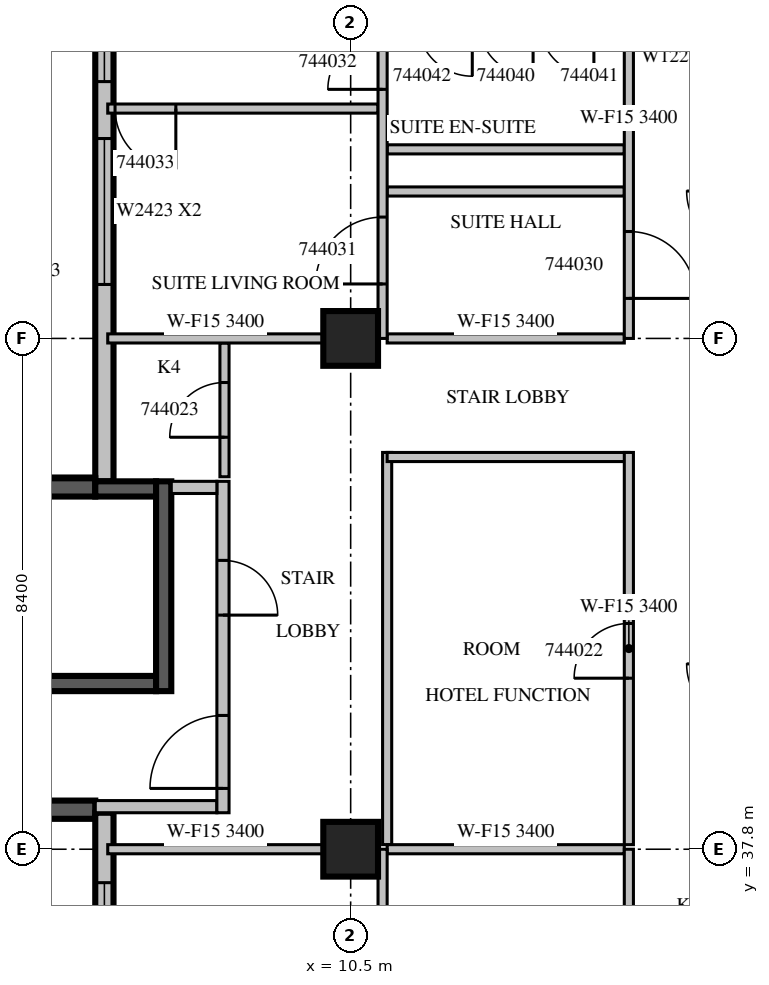
"""IFC4 building model, lengths in metres.
Left out: names, types, materials, properties, quantities, classifications, styles, units other than length and angle.
Written with IfcOpenShell. Run it as: python <this file> out.ifc"""

import sys

from ifc_helpers import new_model, si_unit, direction, frame, frame_2d, origin, origin_2d, place, context, subcontext, project, spatial, rectangle, extrude, source, transform, mapped, element, fill, save


model = new_model("IFC4")
c1 = context("Model", 3, precision=1e-05, world=origin(), true_north=direction((0.0, 1.0)))
c2 = subcontext(c1, "Body", "Model", "MODEL_VIEW")
j1 = project(units=[si_unit("LENGTHUNIT", "METRE"), si_unit("PLANEANGLEUNIT", "RADIAN")], contexts=[c1])
p1 = place(None, origin())
s1 = spatial("IfcSite", under=j1, at=p1, CompositionType="ELEMENT")
p2 = place(p1, origin())
s2 = spatial("IfcBuilding", under=s1, at=p2, CompositionType="ELEMENT")
p3 = place(p2, frame((0.0, 0.0, 200.6)))
s3 = spatial("IfcBuildingStorey", under=s2, at=p3, CompositionType="ELEMENT", Elevation=200.6)
m1 = source(origin(), c2, "Body", "SweptSolid", [
    extrude(rectangle(XDim=0.9, YDim=0.9, at=origin_2d()), origin(), (0.0, 0.0, 1.0), 3.8),
])
for number, where, z_axis, x_axis in (
    (1, (10.5, 37.8, 0.0), (0.0, 0.0, 1.0), (1.0, 0.0, 0.0)),
    (2, (10.5, 46.2, 0.0), (0.0, 0.0, 1.0), (1.0, 0.0, 0.0)),
):
    element("IfcColumn", number, at=place(p3, frame(where, z_axis=z_axis, x_axis=x_axis)), inside=s3, PredefinedType="COLUMN", context=c2, shape_type="MappedRepresentation", body=[
        mapped(m1, transform((0.0, 0.0, 0.0), scale=1.0)),
    ])
m2 = source(origin(), c2, "Body", "SweptSolid", [
    extrude(rectangle(XDim=9.91, YDim=0.3, at=frame_2d((4.955, 0.0))), origin(), (0.0, 0.0, 1.0), 3.4),
])
p4 = place(p3, frame((6.45, 53.76, 0.0), z_axis=(0.0, 0.0, 1.0), x_axis=(0.0, -1.0, 0.0)))
e3 = element("IfcWall", 3, at=p4, inside=s3, PredefinedType="STANDARD", context=c2, shape_type="MappedRepresentation", body=[
    mapped(m2, transform((0.0, 0.0, 0.0), scale=1.0)),
])
m3 = source(origin(), c2, "Body", "SweptSolid", [
    extrude(rectangle(XDim=2.4, YDim=2.3, at=frame_2d((1.2, 1.15))), frame((0.0, 0.16, 0.0), z_axis=(0.0, -1.0, 0.0), x_axis=(1.0, 0.0, 0.0)), (0.0, 0.0, 1.0), 0.32),
])
p5 = place(p4, frame((4.272, 0.0, 0.6)))
e4 = element("IfcOpeningElement", 4, at=p5, cuts=e3, PredefinedType="OPENING", context=c2, shape_type="MappedRepresentation", body=[
    mapped(m3, transform((0.0, 0.0, 0.0), scale=1.0)),
])
p6 = place(p4, frame((0.936, 0.0, 0.6)))
e5 = element("IfcOpeningElement", 5, at=p6, cuts=e3, PredefinedType="OPENING", context=c2, shape_type="MappedRepresentation", body=[
    mapped(m3, transform((0.0, 0.0, 0.0), scale=1.0)),
])
m4 = source(origin(), c2, "Body", "SweptSolid", [
    extrude(rectangle(XDim=6.1, YDim=0.3, at=frame_2d((3.05, 0.0))), origin(), (0.0, 0.0, 1.0), 3.4),
])
for number, where, z_axis, x_axis in (
    (6, (6.3, 43.75, 0.0), (0.0, 0.0, 1.0), (-1.0, 0.0, 0.0)),
    (7, (0.2, 38.45, 0.0), (0.0, 0.0, 1.0), (1.0, 0.0, 0.0)),
):
    element("IfcWall", number, at=place(p3, frame(where, z_axis=z_axis, x_axis=x_axis)), inside=s3, PredefinedType="SOLIDWALL", context=c2, shape_type="MappedRepresentation", body=[
        mapped(m4, transform((0.0, 0.0, 0.0), scale=1.0)),
    ])
m5 = source(origin(), c2, "Body", "SweptSolid", [
    extrude(rectangle(XDim=16.6, YDim=0.3, at=frame_2d((8.3, 0.0))), origin(), (0.0, 0.0, 1.0), 3.4),
])
p7 = place(p3, frame((6.45, 38.4, 0.0), z_axis=(0.0, 0.0, 1.0), x_axis=(0.0, -1.0, 0.0)))
e8 = element("IfcWall", 8, at=p7, inside=s3, PredefinedType="STANDARD", context=c2, shape_type="MappedRepresentation", body=[
    mapped(m5, transform((0.0, 0.0, 0.0), scale=1.0)),
])
m6 = source(origin(), c2, "Body", "SweptSolid", [
    extrude(rectangle(XDim=1.8, YDim=2.3, at=frame_2d((0.9, 1.15))), frame((0.0, 0.16, 0.0), z_axis=(0.0, -1.0, 0.0), x_axis=(1.0, 0.0, 0.0)), (0.0, 0.0, 1.0), 0.32),
])
p8 = place(p7, frame((1.15, 0.0, 0.6)))
e9 = element("IfcOpeningElement", 9, at=p8, cuts=e8, PredefinedType="OPENING", context=c2, shape_type="MappedRepresentation", body=[
    mapped(m6, transform((0.0, 0.0, 0.0), scale=1.0)),
])
p9 = place(p7, frame((9.438, 0.0, 0.6)))
e10 = element("IfcOpeningElement", 10, at=p9, cuts=e8, PredefinedType="OPENING", context=c2, shape_type="MappedRepresentation", body=[
    mapped(m6, transform((0.0, 0.0, 0.0), scale=1.0)),
])
m7 = source(origin(), c2, "Body", "SweptSolid", [
    extrude(rectangle(XDim=1.2, YDim=2.3, at=frame_2d((0.6, 1.15))), frame((0.0, 0.16, 0.0), z_axis=(0.0, -1.0, 0.0), x_axis=(1.0, 0.0, 0.0)), (0.0, 0.0, 1.0), 0.32),
])
p10 = place(p7, frame((14.338, 0.0, 0.6)))
e11 = element("IfcOpeningElement", 11, at=p10, cuts=e8, PredefinedType="OPENING", context=c2, shape_type="MappedRepresentation", body=[
    mapped(m7, transform((0.0, 0.0, 0.0), scale=1.0)),
])
p11 = place(p7, frame((11.887, 0.0, 0.6)))
e12 = element("IfcOpeningElement", 12, at=p11, cuts=e8, PredefinedType="OPENING", context=c2, shape_type="MappedRepresentation", body=[
    mapped(m6, transform((0.0, 0.0, 0.0), scale=1.0)),
])
m8 = source(origin(), c2, "Body", "SweptSolid", [
    extrude(rectangle(XDim=1.0, YDim=2.1, at=frame_2d((0.5, 1.05))), frame((0.0, 0.16, 0.0), z_axis=(0.0, -1.0, 0.0), x_axis=(1.0, 0.0, 0.0)), (0.0, 0.0, 1.0), 0.32),
])
p12 = place(p7, frame((5.908, 0.0, 0.0)))
e13 = element("IfcOpeningElement", 13, at=p12, cuts=e8, PredefinedType="OPENING", context=c2, shape_type="MappedRepresentation", body=[
    mapped(m8, transform((0.0, 0.0, 0.0), scale=1.0)),
])
m9 = source(origin(), c2, "Body", "SweptSolid", [
    extrude(rectangle(XDim=7.0, YDim=0.25, at=frame_2d((3.5, 0.0))), origin(), (0.0, 0.0, 1.0), 3.4),
])
p13 = place(p3, frame((0.3, 40.525, 0.0), z_axis=(0.0, 0.0, 1.0), x_axis=(1.0, 0.0, 0.0)))
e14 = element("IfcWall", 14, at=p13, inside=s3, PredefinedType="SOLIDWALL", context=c2, shape_type="MappedRepresentation", body=[
    mapped(m9, transform((0.0, 0.0, 0.0), scale=1.0)),
])
m10 = source(origin(), c2, "Body", "SweptSolid", [
    extrude(rectangle(XDim=1.1, YDim=2.1, at=frame_2d((0.55, 1.05))), frame((0.0, 0.135, 0.0), z_axis=(0.0, -1.0, 0.0), x_axis=(1.0, 0.0, 0.0)), (0.0, 0.0, 1.0), 0.27),
])
p14 = place(p13, frame((0.55, 0.0, 0.0)))
e15 = element("IfcOpeningElement", 15, at=p14, cuts=e14, PredefinedType="OPENING", context=c2, shape_type="MappedRepresentation", body=[
    mapped(m10, transform((0.0, 0.0, 0.0), scale=1.0)),
])
m11 = source(origin(), c2, "Body", "SweptSolid", [
    extrude(rectangle(XDim=1.0, YDim=0.25, at=frame_2d((0.5, 0.0))), origin(), (0.0, 0.0, 1.0), 3.4),
])
p15 = place(p3, frame((6.3, 43.725, 0.0), z_axis=(0.0, 0.0, 1.0), x_axis=(1.0, 0.0, 0.0)))
e16 = element("IfcWall", 16, at=p15, inside=s3, PredefinedType="SOLIDWALL", context=c2, shape_type="MappedRepresentation", body=[
    mapped(m11, transform((0.0, 0.0, 0.0), scale=1.0)),
])
m12 = source(origin(), c2, "Body", "SweptSolid", [
    extrude(rectangle(XDim=3.45, YDim=0.25, at=frame_2d((1.725, 0.0))), origin(), (0.0, 0.0, 1.0), 3.4),
])
p16 = place(p3, frame((7.425, 40.4, 0.0), z_axis=(0.0, 0.0, 1.0), x_axis=(0.0, 1.0, 0.0)))
e17 = element("IfcWall", 17, at=p16, inside=s3, PredefinedType="SOLIDWALL", context=c2, shape_type="MappedRepresentation", body=[
    mapped(m12, transform((0.0, 0.0, 0.0), scale=1.0)),
])
m13 = source(origin(), c2, "Body", "SweptSolid", [
    extrude(rectangle(XDim=2.0, YDim=0.2, at=frame_2d((1.0, 0.0))), origin(), (0.0, 0.0, 1.0), 3.4),
])
p17 = place(p3, frame((6.3, 38.5, 0.0), z_axis=(0.0, 0.0, 1.0), x_axis=(1.0, 0.0, 0.0)))
e18 = element("IfcWall", 18, at=p17, inside=s3, PredefinedType="PARTITIONING", context=c2, shape_type="MappedRepresentation", body=[
    mapped(m13, transform((0.0, 0.0, 0.0), scale=1.0)),
])
m14 = source(origin(), c2, "Body", "SweptSolid", [
    extrude(rectangle(XDim=5.45, YDim=0.2, at=frame_2d((2.725, 0.0))), origin(), (0.0, 0.0, 1.0), 3.4),
])
p18 = place(p3, frame((8.4, 38.4, 0.0), z_axis=(0.0, 0.0, 1.0), x_axis=(0.0, 1.0, 0.0)))
e19 = element("IfcWall", 19, at=p18, inside=s3, PredefinedType="PARTITIONING", context=c2, shape_type="MappedRepresentation", body=[
    mapped(m14, transform((0.0, 0.0, 0.0), scale=1.0)),
])
m15 = source(origin(), c2, "Body", "SweptSolid", [
    extrude(rectangle(XDim=1.2, YDim=2.1, at=frame_2d((0.6, 1.05))), frame((0.0, 0.11, 0.0), z_axis=(0.0, -1.0, 0.0), x_axis=(1.0, 0.0, 0.0)), (0.0, 0.0, 1.0), 0.22),
])
p19 = place(p18, frame((0.4, 0.0, 0.0)))
e20 = element("IfcOpeningElement", 20, at=p19, cuts=e19, PredefinedType="OPENING", context=c2, shape_type="MappedRepresentation", body=[
    mapped(m15, transform((0.0, 0.0, 0.0), scale=1.0)),
])
m16 = source(origin(), c2, "Body", "SweptSolid", [
    extrude(rectangle(XDim=0.9, YDim=2.1, at=frame_2d((0.45, 1.05))), frame((0.0, 0.11, 0.0), z_axis=(0.0, -1.0, 0.0), x_axis=(1.0, 0.0, 0.0)), (0.0, 0.0, 1.0), 0.22),
])
p20 = place(p18, frame((3.25, 0.0, 0.0)))
e21 = element("IfcOpeningElement", 21, at=p20, cuts=e19, PredefinedType="OPENING", context=c2, shape_type="MappedRepresentation", body=[
    mapped(m16, transform((0.0, 0.0, 0.0), scale=1.0)),
])
m17 = source(origin(), c2, "Body", "SweptSolid", [
    extrude(rectangle(XDim=0.75, YDim=0.2, at=frame_2d((0.375, 0.0))), origin(), (0.0, 0.0, 1.0), 3.4),
])
p21 = place(p3, frame((7.55, 43.75, 0.0), z_axis=(0.0, 0.0, 1.0), x_axis=(1.0, 0.0, 0.0)))
e22 = element("IfcWall", 22, at=p21, inside=s3, PredefinedType="PARTITIONING", context=c2, shape_type="MappedRepresentation", body=[
    mapped(m17, transform((0.0, 0.0, 0.0), scale=1.0)),
])
m18 = source(origin(), c2, "Body", "SweptSolid", [
    extrude(rectangle(XDim=6.45, YDim=0.15, at=frame_2d((3.225, 0.0))), origin(), (0.0, 0.0, 1.0), 3.4),
])
p22 = place(p3, frame((11.1, 44.325, 0.0), z_axis=(0.0, 0.0, 1.0), x_axis=(0.0, -1.0, 0.0)))
e23 = element("IfcWall", 23, at=p22, inside=s3, PredefinedType="PARTITIONING", context=c2, shape_type="MappedRepresentation", body=[
    mapped(m18, transform((0.0, 0.0, 0.0), scale=1.0)),
])
m19 = source(origin(), c2, "Body", "SweptSolid", [
    extrude(rectangle(XDim=3.975, YDim=0.15, at=frame_2d((1.988, 0.0))), origin(), (0.0, 0.0, 1.0), 3.4),
])
p23 = place(p3, frame((15.075, 44.25, 0.0), z_axis=(0.0, 0.0, 1.0), x_axis=(-1.0, 0.0, 0.0)))
e24 = element("IfcWall", 24, at=p23, inside=s3, PredefinedType="PARTITIONING", context=c2, shape_type="MappedRepresentation", body=[
    mapped(m19, transform((0.0, 0.0, 0.0), scale=1.0)),
])
p24 = place(p3, frame((15.075, 37.875, 0.0), z_axis=(0.0, 0.0, 1.0), x_axis=(0.0, 1.0, 0.0)))
e25 = element("IfcWall", 25, at=p24, inside=s3, PredefinedType="PARTITIONING", context=c2, shape_type="MappedRepresentation", body=[
    mapped(m18, transform((0.0, 0.0, 0.0), scale=1.0)),
])
m20 = source(origin(), c2, "Body", "SweptSolid", [
    extrude(rectangle(XDim=0.9, YDim=2.1, at=frame_2d((0.45, 1.05))), frame((0.0, 0.085, 0.0), z_axis=(0.0, -1.0, 0.0), x_axis=(1.0, 0.0, 0.0)), (0.0, 0.0, 1.0), 0.17),
])
p25 = place(p24, frame((2.737, 0.0, 0.0)))
e26 = element("IfcOpeningElement", 26, at=p25, cuts=e25, PredefinedType="OPENING", context=c2, shape_type="MappedRepresentation", body=[
    mapped(m20, transform((0.0, 0.0, 0.0), scale=1.0)),
])
m21 = source(origin(), c2, "Body", "SweptSolid", [
    extrude(rectangle(XDim=2.2, YDim=0.15, at=frame_2d((1.1, 0.0))), origin(), (0.0, 0.0, 1.0), 3.4),
])
p26 = place(p3, frame((8.425, 43.925, 0.0), z_axis=(0.0, 0.0, 1.0), x_axis=(0.0, 1.0, 0.0)))
e27 = element("IfcWall", 27, at=p26, inside=s3, PredefinedType="PARTITIONING", context=c2, shape_type="MappedRepresentation", body=[
    mapped(m21, transform((0.0, 0.0, 0.0), scale=1.0)),
])
p27 = place(p26, frame((0.65, 0.0, 0.0)))
e28 = element("IfcOpeningElement", 28, at=p27, cuts=e27, PredefinedType="OPENING", context=c2, shape_type="MappedRepresentation", body=[
    mapped(m20, transform((0.0, 0.0, 0.0), scale=1.0)),
])
m22 = source(origin(), c2, "Body", "SweptSolid", [
    extrude(rectangle(XDim=3.546, YDim=0.15, at=frame_2d((1.773, 0.0))), origin(), (0.0, 0.0, 1.0), 3.4),
])
p28 = place(p3, frame((10.051, 37.8, 0.0), z_axis=(0.0, 0.0, 1.0), x_axis=(-1.0, 0.0, 0.0)))
e29 = element("IfcWall", 29, at=p28, inside=s3, PredefinedType="PARTITIONING", context=c2, shape_type="MappedRepresentation", body=[
    mapped(m22, transform((0.0, 0.0, 0.0), scale=1.0)),
])
m23 = source(origin(), c2, "Body", "SweptSolid", [
    extrude(rectangle(XDim=3.9, YDim=0.15, at=frame_2d((1.95, 0.0))), origin(), (0.0, 0.0, 1.0), 3.4),
])
p29 = place(p3, frame((15.0, 37.8, 0.0), z_axis=(0.0, 0.0, 1.0), x_axis=(-1.0, 0.0, 0.0)))
e30 = element("IfcWall", 30, at=p29, inside=s3, PredefinedType="PARTITIONING", context=c2, shape_type="MappedRepresentation", body=[
    mapped(m23, transform((0.0, 0.0, 0.0), scale=1.0)),
])
m24 = source(origin(), c2, "Body", "SweptSolid", [
    extrude(rectangle(XDim=8.4, YDim=0.15, at=frame_2d((4.2, 0.0))), origin(), (0.0, 0.0, 1.0), 3.4),
])
p30 = place(p3, frame((11.025, 29.4, 0.0), z_axis=(0.0, 0.0, 1.0), x_axis=(0.0, 1.0, 0.0)))
e31 = element("IfcWall", 31, at=p30, inside=s3, PredefinedType="PARTITIONING", context=c2, shape_type="MappedRepresentation", body=[
    mapped(m24, transform((0.0, 0.0, 0.0), scale=1.0)),
])
p31 = place(p30, frame((1.418, 0.0, 0.0)))
e32 = element("IfcOpeningElement", 32, at=p31, cuts=e31, PredefinedType="OPENING", context=c2, shape_type="MappedRepresentation", body=[
    mapped(m20, transform((0.0, 0.0, 0.0), scale=1.0)),
])
p32 = place(p30, frame((0.46, 0.0, 0.0)))
e33 = element("IfcOpeningElement", 33, at=p32, cuts=e31, PredefinedType="OPENING", context=c2, shape_type="MappedRepresentation", body=[
    mapped(m20, transform((0.0, 0.0, 0.0), scale=1.0)),
])
p33 = place(p30, frame((4.525, 0.0, 0.0)))
e34 = element("IfcOpeningElement", 34, at=p33, cuts=e31, PredefinedType="OPENING", context=c2, shape_type="MappedRepresentation", body=[
    mapped(m20, transform((0.0, 0.0, 0.0), scale=1.0)),
])
p34 = place(p30, frame((6.387, 0.0, 0.0)))
e35 = element("IfcOpeningElement", 35, at=p34, cuts=e31, PredefinedType="OPENING", context=c2, shape_type="MappedRepresentation", body=[
    mapped(m20, transform((0.0, 0.0, 0.0), scale=1.0)),
])
m25 = source(origin(), c2, "Body", "SweptSolid", [
    extrude(rectangle(XDim=4.445, YDim=0.15, at=frame_2d((2.223, 0.0))), origin(), (0.0, 0.0, 1.0), 3.4),
])
p35 = place(p3, frame((10.95, 49.98, 0.0), z_axis=(0.0, 0.0, 1.0), x_axis=(-1.0, 0.0, 0.0)))
e36 = element("IfcWall", 36, at=p35, inside=s3, PredefinedType="PARTITIONING", context=c2, shape_type="MappedRepresentation", body=[
    mapped(m25, transform((0.0, 0.0, 0.0), scale=1.0)),
])
m26 = source(origin(), c2, "Body", "SweptSolid", [
    extrude(rectangle(XDim=1.0, YDim=2.1, at=frame_2d((0.5, 1.05))), frame((0.0, 0.085, 0.0), z_axis=(0.0, -1.0, 0.0), x_axis=(1.0, 0.0, 0.0)), (0.0, 0.0, 1.0), 0.17),
])
p36 = place(p35, frame((3.325, 0.0, 0.0)))
e37 = element("IfcOpeningElement", 37, at=p36, cuts=e36, PredefinedType="OPENING", context=c2, shape_type="MappedRepresentation", body=[
    mapped(m26, transform((0.0, 0.0, 0.0), scale=1.0)),
])
for number, where, z_axis, x_axis in (
    (38, (15.0, 48.617, 0.0), (0.0, 0.0, 1.0), (-1.0, 0.0, 0.0)),
    (39, (15.0, 49.309, 0.0), (0.0, 0.0, 1.0), (-1.0, 0.0, 0.0)),
):
    element("IfcWall", number, at=place(p3, frame(where, z_axis=z_axis, x_axis=x_axis)), inside=s3, PredefinedType="PARTITIONING", context=c2, shape_type="MappedRepresentation", body=[
        mapped(m23, transform((0.0, 0.0, 0.0), scale=1.0)),
    ])
p37 = place(p3, frame((10.051, 46.2, 0.0), z_axis=(0.0, 0.0, 1.0), x_axis=(-1.0, 0.0, 0.0)))
e40 = element("IfcWall", 40, at=p37, inside=s3, PredefinedType="PARTITIONING", context=c2, shape_type="MappedRepresentation", body=[
    mapped(m22, transform((0.0, 0.0, 0.0), scale=1.0)),
])
p38 = place(p3, frame((15.0, 46.2, 0.0), z_axis=(0.0, 0.0, 1.0), x_axis=(-1.0, 0.0, 0.0)))
e41 = element("IfcWall", 41, at=p38, inside=s3, PredefinedType="PARTITIONING", context=c2, shape_type="MappedRepresentation", body=[
    mapped(m23, transform((0.0, 0.0, 0.0), scale=1.0)),
])
m27 = source(origin(), c2, "Body", "SweptSolid", [
    extrude(rectangle(XDim=7.26, YDim=0.15, at=frame_2d((3.63, 0.0))), origin(), (0.0, 0.0, 1.0), 3.4),
])
p39 = place(p3, frame((11.025, 46.2, 0.0), z_axis=(0.0, 0.0, 1.0), x_axis=(0.0, 1.0, 0.0)))
e42 = element("IfcWall", 42, at=p39, inside=s3, PredefinedType="PARTITIONING", context=c2, shape_type="MappedRepresentation", body=[
    mapped(m27, transform((0.0, 0.0, 0.0), scale=1.0)),
])
m28 = source(origin(), c2, "Body", "SweptSolid", [
    extrude(rectangle(XDim=1.1, YDim=2.1, at=frame_2d((0.55, 1.05))), frame((0.0, 0.085, 0.0), z_axis=(0.0, -1.0, 0.0), x_axis=(1.0, 0.0, 0.0)), (0.0, 0.0, 1.0), 0.17),
])
p40 = place(p39, frame((0.896, 0.0, 0.0)))
e43 = element("IfcOpeningElement", 43, at=p40, cuts=e42, PredefinedType="OPENING", context=c2, shape_type="MappedRepresentation", body=[
    mapped(m28, transform((0.0, 0.0, 0.0), scale=1.0)),
])
p41 = place(p39, frame((4.096, 0.0, 0.0)))
e44 = element("IfcOpeningElement", 44, at=p41, cuts=e42, PredefinedType="OPENING", context=c2, shape_type="MappedRepresentation", body=[
    mapped(m20, transform((0.0, 0.0, 0.0), scale=1.0)),
])
p42 = place(p3, frame((15.075, 29.4, 0.0), z_axis=(0.0, 0.0, 1.0), x_axis=(0.0, 1.0, 0.0)))
e45 = element("IfcWall", 45, at=p42, inside=s3, PredefinedType="PARTITIONING", context=c2, shape_type="MappedRepresentation", body=[
    mapped(m24, transform((0.0, 0.0, 0.0), scale=1.0)),
])
m29 = source(origin(), c2, "Body", "SweptSolid", [
    extrude(rectangle(XDim=1.2, YDim=2.1, at=frame_2d((0.6, 1.05))), frame((0.0, 0.085, 0.0), z_axis=(0.0, -1.0, 0.0), x_axis=(1.0, 0.0, 0.0)), (0.0, 0.0, 1.0), 0.17),
])
p43 = place(p42, frame((1.03, 0.0, 0.0)))
e46 = element("IfcOpeningElement", 46, at=p43, cuts=e45, PredefinedType="OPENING", context=c2, shape_type="MappedRepresentation", body=[
    mapped(m29, transform((0.0, 0.0, 0.0), scale=1.0)),
])
p44 = place(p3, frame((15.075, 46.2, 0.0), z_axis=(0.0, 0.0, 1.0), x_axis=(0.0, 1.0, 0.0)))
e47 = element("IfcWall", 47, at=p44, inside=s3, PredefinedType="PARTITIONING", context=c2, shape_type="MappedRepresentation", body=[
    mapped(m27, transform((0.0, 0.0, 0.0), scale=1.0)),
])
p45 = place(p44, frame((0.658, 0.0, 0.0)))
e48 = element("IfcOpeningElement", 48, at=p45, cuts=e47, PredefinedType="OPENING", context=c2, shape_type="MappedRepresentation", body=[
    mapped(m28, transform((0.0, 0.0, 0.0), scale=1.0)),
])
m30 = source(origin(), c2, "Body", "SweptSolid", [
    extrude(rectangle(XDim=2.4, YDim=2.3, at=frame_2d((1.2, 1.15))), frame((0.0, 0.03, 0.0), z_axis=(0.0, -1.0, 0.0), x_axis=(1.0, 0.0, 0.0)), (0.0, 0.0, 1.0), 0.06),
])
p46 = place(p5, origin())
e49 = element("IfcWindow", 49, at=p46, inside=s3, PartitioningType="SINGLE_PANEL", PredefinedType="WINDOW", context=c2, shape_type="MappedRepresentation", body=[
    mapped(m30, transform((0.0, 0.0, 0.0), scale=1.0)),
])
fill(e4, e49)
p47 = place(p6, origin())
e50 = element("IfcWindow", 50, at=p47, inside=s3, PartitioningType="SINGLE_PANEL", PredefinedType="WINDOW", context=c2, shape_type="MappedRepresentation", body=[
    mapped(m30, transform((0.0, 0.0, 0.0), scale=1.0)),
])
fill(e5, e50)
m31 = source(origin(), c2, "Body", "SweptSolid", [
    extrude(rectangle(XDim=1.8, YDim=2.3, at=frame_2d((0.9, 1.15))), frame((0.0, 0.03, 0.0), z_axis=(0.0, -1.0, 0.0), x_axis=(1.0, 0.0, 0.0)), (0.0, 0.0, 1.0), 0.06),
])
p48 = place(p8, origin())
e51 = element("IfcWindow", 51, at=p48, inside=s3, PartitioningType="SINGLE_PANEL", PredefinedType="WINDOW", context=c2, shape_type="MappedRepresentation", body=[
    mapped(m31, transform((0.0, 0.0, 0.0), scale=1.0)),
])
fill(e9, e51)
m32 = source(origin(), c2, "Body", "SweptSolid", [
    extrude(rectangle(XDim=1.2, YDim=2.1, at=frame_2d((0.6, 1.05))), frame((0.0, 0.025, 0.0), z_axis=(0.0, -1.0, 0.0), x_axis=(1.0, 0.0, 0.0)), (0.0, 0.0, 1.0), 0.05),
])
p49 = place(p19, origin())
e52 = element("IfcDoor", 52, at=p49, inside=s3, OperationType="SINGLE_SWING_LEFT", PredefinedType="DOOR", context=c2, shape_type="MappedRepresentation", body=[
    mapped(m32, transform((0.0, 0.0, 0.0), scale=1.0)),
])
fill(e20, e52)
m33 = source(origin(), c2, "Body", "SweptSolid", [
    extrude(rectangle(XDim=0.9, YDim=2.1, at=frame_2d((0.45, 1.05))), frame((0.0, 0.025, 0.0), z_axis=(0.0, -1.0, 0.0), x_axis=(1.0, 0.0, 0.0)), (0.0, 0.0, 1.0), 0.05),
])
p50 = place(p20, origin())
e53 = element("IfcDoor", 53, at=p50, inside=s3, OperationType="SINGLE_SWING_RIGHT", PredefinedType="DOOR", context=c2, shape_type="MappedRepresentation", body=[
    mapped(m33, transform((0.0, 0.0, 0.0), scale=1.0)),
])
fill(e21, e53)
p51 = place(p25, origin())
e54 = element("IfcDoor", 54, at=p51, inside=s3, OperationType="SINGLE_SWING_LEFT", PredefinedType="DOOR", context=c2, shape_type="MappedRepresentation", body=[
    mapped(m33, transform((0.0, 0.0, 0.0), scale=1.0)),
])
fill(e26, e54)
p52 = place(p27, origin())
e55 = element("IfcDoor", 55, at=p52, inside=s3, OperationType="SINGLE_SWING_LEFT", PredefinedType="DOOR", context=c2, shape_type="MappedRepresentation", body=[
    mapped(m33, transform((0.0, 0.0, 0.0), scale=1.0)),
])
fill(e28, e55)
m34 = source(origin(), c2, "Body", "SweptSolid", [
    extrude(rectangle(XDim=1.1, YDim=2.1, at=frame_2d((0.55, 1.05))), frame((0.0, 0.025, 0.0), z_axis=(0.0, -1.0, 0.0), x_axis=(1.0, 0.0, 0.0)), (0.0, 0.0, 1.0), 0.05),
])
p53 = place(p45, origin())
e56 = element("IfcDoor", 56, at=p53, inside=s3, OperationType="SINGLE_SWING_RIGHT", PredefinedType="DOOR", context=c2, shape_type="MappedRepresentation", body=[
    mapped(m34, transform((0.0, 0.0, 0.0), scale=1.0)),
])
fill(e48, e56)
p54 = place(p40, origin())
e57 = element("IfcDoor", 57, at=p54, inside=s3, OperationType="SINGLE_SWING_LEFT", PredefinedType="DOOR", context=c2, shape_type="MappedRepresentation", body=[
    mapped(m34, transform((0.0, 0.0, 0.0), scale=1.0)),
])
fill(e43, e57)
p55 = place(p41, origin())
e58 = element("IfcDoor", 58, at=p55, inside=s3, OperationType="SINGLE_SWING_LEFT", PredefinedType="DOOR", context=c2, shape_type="MappedRepresentation", body=[
    mapped(m33, transform((0.0, 0.0, 0.0), scale=1.0)),
])
fill(e44, e58)
m35 = source(origin(), c2, "Body", "SweptSolid", [
    extrude(rectangle(XDim=1.0, YDim=2.1, at=frame_2d((0.5, 1.05))), frame((0.0, 0.025, 0.0), z_axis=(0.0, -1.0, 0.0), x_axis=(1.0, 0.0, 0.0)), (0.0, 0.0, 1.0), 0.05),
])
p56 = place(p36, origin())
e59 = element("IfcDoor", 59, at=p56, inside=s3, OperationType="SINGLE_SWING_LEFT", PredefinedType="DOOR", context=c2, shape_type="MappedRepresentation", body=[
    mapped(m35, transform((0.0, 0.0, 0.0), scale=1.0)),
])
fill(e37, e59)
save(model, sys.argv[1])
